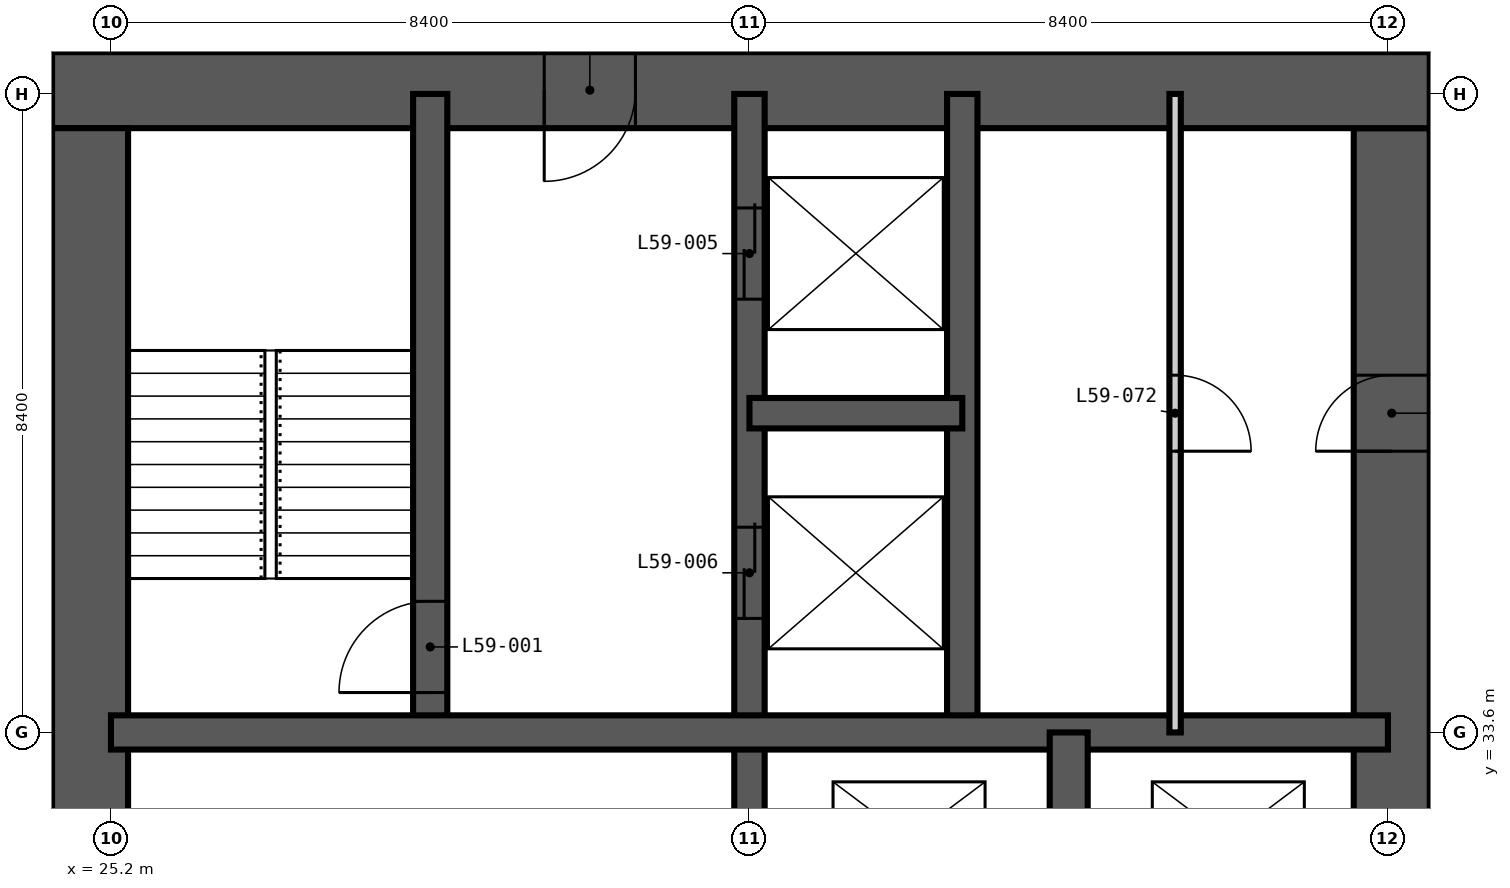
"""IFC4 building model, lengths in metres.
Left out: names, types, materials, properties, quantities, classifications, styles, units other than length and angle.
Written with IfcOpenShell. Run it as: python <this file> out.ifc"""

import sys

from ifc_helpers import new_model, si_unit, direction, frame, frame_2d, origin, place, context, subcontext, project, spatial, rectangle, extrude, element, fill, save


model = new_model("IFC4")
c1 = context("Model", 3, precision=1e-05, world=origin(), true_north=direction((0.0, 1.0)))
c2 = subcontext(c1, "Body", "Model", "MODEL_VIEW")
j1 = project(units=[si_unit("LENGTHUNIT", "METRE"), si_unit("PLANEANGLEUNIT", "RADIAN")], contexts=[c1])
p1 = place(None, origin())
s1 = spatial("IfcSite", under=j1, at=p1, CompositionType="ELEMENT")
p2 = place(p1, origin())
s2 = spatial("IfcBuilding", under=s1, at=p2, CompositionType="ELEMENT")
p3 = place(p2, frame((0.0, 0.0, 229.5)))
s3 = spatial("IfcBuildingStorey", under=s2, at=p3, CompositionType="ELEMENT", Elevation=229.5)
p4 = place(p3, frame((42.05, 17.25, -0.35), z_axis=(0.0, 0.0, 1.0), x_axis=(0.0, 1.0, 0.0)))
e1 = element("IfcWall", 1, at=p4, inside=s3, PredefinedType="SHEAR", context=c2, shape_type="SweptSolid", body=[
    extrude(rectangle(XDim=24.3, YDim=1.0, at=frame_2d((12.15, 0.0))), origin(), (0.0, 0.0, 1.0), 3.9),
])
p5 = place(p4, frame((0.35, 0.0, 0.35)))
e2 = element("IfcOpeningElement", 2, at=p5, cuts=e1, PredefinedType="OPENING", context=c2, shape_type="SweptSolid", body=[
    extrude(rectangle(XDim=1.2, YDim=2.2, at=frame_2d((0.6, 1.1))), frame((0.0, 0.51, 0.0), z_axis=(0.0, -1.0, 0.0), x_axis=(1.0, 0.0, 0.0)), (0.0, 0.0, 1.0), 1.02),
])
p6 = place(p4, frame((11.25, 0.0, 0.35)))
e3 = element("IfcOpeningElement", 3, at=p6, cuts=e1, PredefinedType="OPENING", context=c2, shape_type="SweptSolid", body=[
    extrude(rectangle(XDim=1.8, YDim=2.2, at=frame_2d((0.9, 1.1))), frame((0.0, 0.51, 0.0), z_axis=(0.0, -1.0, 0.0), x_axis=(1.0, 0.0, 0.0)), (0.0, 0.0, 1.0), 1.02),
])
p7 = place(p4, frame((20.05, 0.0, 0.35)))
e4 = element("IfcOpeningElement", 4, at=p7, cuts=e1, PredefinedType="OPENING", context=c2, shape_type="SweptSolid", body=[
    extrude(rectangle(XDim=1.0, YDim=2.1, at=frame_2d((0.5, 1.05))), frame((0.0, 0.51, 0.0), z_axis=(0.0, -1.0, 0.0), x_axis=(1.0, 0.0, 0.0)), (0.0, 0.0, 1.0), 1.02),
])
p8 = place(p3, frame((42.55, 42.05, -0.35), z_axis=(0.0, 0.0, 1.0), x_axis=(-1.0, 0.0, 0.0)))
e5 = element("IfcWall", 5, at=p8, inside=s3, PredefinedType="SHEAR", context=c2, shape_type="SweptSolid", body=[
    extrude(rectangle(XDim=18.125, YDim=1.0, at=frame_2d((9.062, 0.0))), origin(), (0.0, 0.0, 1.0), 3.9),
])
p9 = place(p8, frame((10.45, 0.0, 0.35)))
e6 = element("IfcOpeningElement", 6, at=p9, cuts=e5, PredefinedType="OPENING", context=c2, shape_type="SweptSolid", body=[
    extrude(rectangle(XDim=1.2, YDim=2.2, at=frame_2d((0.6, 1.1))), frame((0.0, 0.51, 0.0), z_axis=(0.0, -1.0, 0.0), x_axis=(1.0, 0.0, 0.0)), (0.0, 0.0, 1.0), 1.02),
])
p10 = place(p3, frame((24.925, 41.55, -0.35), z_axis=(0.0, 0.0, 1.0), x_axis=(0.0, -1.0, 0.0)))
e7 = element("IfcWall", 7, at=p10, inside=s3, PredefinedType="SHEAR", context=c2, shape_type="SweptSolid", body=[
    extrude(rectangle(XDim=24.3, YDim=1.0, at=frame_2d((12.15, 0.0))), origin(), (0.0, 0.0, 1.0), 3.9),
])
p11 = place(p10, frame((11.65, 0.0, 0.35)))
e8 = element("IfcOpeningElement", 8, at=p11, cuts=e7, PredefinedType="OPENING", context=c2, shape_type="SweptSolid", body=[
    extrude(rectangle(XDim=1.0, YDim=2.1, at=frame_2d((0.5, 1.05))), frame((0.0, 0.51, 0.0), z_axis=(0.0, -1.0, 0.0), x_axis=(1.0, 0.0, 0.0)), (0.0, 0.0, 1.0), 1.02),
])
p12 = place(p3, frame((33.6, 16.8, -0.35), z_axis=(0.0, 0.0, 1.0), x_axis=(0.0, 1.0, 0.0)))
e9 = element("IfcWall", 9, at=p12, inside=s3, PredefinedType="SHEAR", context=c2, shape_type="SweptSolid", body=[
    extrude(rectangle(XDim=25.2, YDim=0.4, at=frame_2d((12.6, 0.0))), origin(), (0.0, 0.0, 1.0), 3.9),
])
p13 = place(p12, frame((22.5, 0.0, 0.35)))
e10 = element("IfcOpeningElement", 10, at=p13, cuts=e9, PredefinedType="OPENING", context=c2, shape_type="SweptSolid", body=[
    extrude(rectangle(XDim=1.2, YDim=2.2, at=frame_2d((0.6, 1.1))), frame((0.0, 0.21, 0.0), z_axis=(0.0, -1.0, 0.0), x_axis=(1.0, 0.0, 0.0)), (0.0, 0.0, 1.0), 0.42),
])
p14 = place(p12, frame((18.3, 0.0, 0.35)))
e11 = element("IfcOpeningElement", 11, at=p14, cuts=e9, PredefinedType="OPENING", context=c2, shape_type="SweptSolid", body=[
    extrude(rectangle(XDim=1.2, YDim=2.2, at=frame_2d((0.6, 1.1))), frame((0.0, 0.21, 0.0), z_axis=(0.0, -1.0, 0.0), x_axis=(1.0, 0.0, 0.0)), (0.0, 0.0, 1.0), 0.42),
])
p15 = place(p12, frame((9.3, 0.0, 0.35)))
e12 = element("IfcOpeningElement", 12, at=p15, cuts=e9, PredefinedType="OPENING", context=c2, shape_type="SweptSolid", body=[
    extrude(rectangle(XDim=1.0, YDim=2.1, at=frame_2d((0.5, 1.05))), frame((0.0, 0.21, 0.0), z_axis=(0.0, -1.0, 0.0), x_axis=(1.0, 0.0, 0.0)), (0.0, 0.0, 1.0), 0.42),
])
p16 = place(p3, frame((36.4, 33.6, -0.35), z_axis=(0.0, 0.0, 1.0), x_axis=(0.0, 1.0, 0.0)))
e13 = element("IfcWall", 13, at=p16, inside=s3, PredefinedType="SHEAR", context=c2, shape_type="SweptSolid", body=[
    extrude(rectangle(XDim=8.4, YDim=0.4, at=frame_2d((4.2, 0.0))), origin(), (0.0, 0.0, 1.0), 3.9),
])
p17 = place(p3, frame((33.6, 37.8, -0.35), z_axis=(0.0, 0.0, 1.0), x_axis=(1.0, 0.0, 0.0)))
e14 = element("IfcWall", 14, at=p17, inside=s3, PredefinedType="SHEAR", context=c2, shape_type="SweptSolid", body=[
    extrude(rectangle(XDim=2.8, YDim=0.4, at=frame_2d((1.4, 0.0))), origin(), (0.0, 0.0, 1.0), 3.9),
])
p18 = place(p3, frame((29.4, 33.6, -0.35), z_axis=(0.0, 0.0, 1.0), x_axis=(0.0, 1.0, 0.0)))
e15 = element("IfcWall", 15, at=p18, inside=s3, PredefinedType="SHEAR", context=c2, shape_type="SweptSolid", body=[
    extrude(rectangle(XDim=8.4, YDim=0.45, at=frame_2d((4.2, 0.0))), origin(), (0.0, 0.0, 1.0), 3.9),
])
p19 = place(p18, frame((0.525, 0.0, 0.35)))
e16 = element("IfcOpeningElement", 16, at=p19, cuts=e15, PredefinedType="OPENING", context=c2, shape_type="SweptSolid", body=[
    extrude(rectangle(XDim=1.2, YDim=2.2, at=frame_2d((0.6, 1.1))), frame((0.0, 0.235, 0.0), z_axis=(0.0, -1.0, 0.0), x_axis=(1.0, 0.0, 0.0)), (0.0, 0.0, 1.0), 0.47),
])
p20 = place(p3, frame((25.2, 33.6, -0.35), z_axis=(0.0, 0.0, 1.0), x_axis=(1.0, 0.0, 0.0)))
e17 = element("IfcWall", 17, at=p20, inside=s3, PredefinedType="SHEAR", context=c2, shape_type="SweptSolid", body=[
    extrude(rectangle(XDim=16.8, YDim=0.45, at=frame_2d((8.4, 0.0))), origin(), (0.0, 0.0, 1.0), 3.9),
])
p21 = place(p3, frame((37.8, 30.8, -0.35), z_axis=(0.0, 0.0, 1.0), x_axis=(0.0, 1.0, 0.0)))
e18 = element("IfcWall", 18, at=p21, inside=s3, PredefinedType="SHEAR", context=c2, shape_type="SweptSolid", body=[
    extrude(rectangle(XDim=2.8, YDim=0.5, at=frame_2d((1.4, 0.0))), origin(), (0.0, 0.0, 1.0), 3.9),
])
p22 = place(p3, frame((39.2, 33.6, 0.0), z_axis=(0.0, 0.0, 1.0), x_axis=(0.0, 1.0, 0.0)))
e19 = element("IfcWall", 19, at=p22, inside=s3, PredefinedType="PARTITIONING", context=c2, shape_type="SweptSolid", body=[
    extrude(rectangle(XDim=8.4, YDim=0.15, at=frame_2d((4.2, 0.0))), origin(), (0.0, 0.0, 1.0), 3.55),
])
p23 = place(p22, frame((3.7, 0.0, 0.0)))
e20 = element("IfcOpeningElement", 20, at=p23, cuts=e19, PredefinedType="OPENING", context=c2, shape_type="SweptSolid", body=[
    extrude(rectangle(XDim=1.0, YDim=2.1, at=frame_2d((0.5, 1.05))), frame((0.0, 0.085, 0.0), z_axis=(0.0, -1.0, 0.0), x_axis=(1.0, 0.0, 0.0)), (0.0, 0.0, 1.0), 0.17),
])
p24 = place(p19, origin())
e21 = element("IfcDoor", 21, at=p24, inside=s3, OperationType="SINGLE_SWING_LEFT", PredefinedType="DOOR", context=c2, shape_type="SweptSolid", body=[
    extrude(rectangle(XDim=1.2, YDim=2.2, at=frame_2d((0.6, 1.1))), frame((0.0, 0.025, 0.0), z_axis=(0.0, -1.0, 0.0), x_axis=(1.0, 0.0, 0.0)), (0.0, 0.0, 1.0), 0.05),
])
fill(e16, e21)
p25 = place(p13, origin())
e22 = element("IfcDoor", 22, at=p25, inside=s3, OperationType="DOUBLE_DOOR_SLIDING", PredefinedType="DOOR", context=c2, shape_type="SweptSolid", body=[
    extrude(rectangle(XDim=1.2, YDim=2.2, at=frame_2d((0.6, 1.1))), frame((0.0, 0.025, 0.0), z_axis=(0.0, -1.0, 0.0), x_axis=(1.0, 0.0, 0.0)), (0.0, 0.0, 1.0), 0.05),
])
fill(e10, e22)
p26 = place(p14, origin())
e23 = element("IfcDoor", 23, at=p26, inside=s3, OperationType="DOUBLE_DOOR_SLIDING", PredefinedType="DOOR", context=c2, shape_type="SweptSolid", body=[
    extrude(rectangle(XDim=1.2, YDim=2.2, at=frame_2d((0.6, 1.1))), frame((0.0, 0.025, 0.0), z_axis=(0.0, -1.0, 0.0), x_axis=(1.0, 0.0, 0.0)), (0.0, 0.0, 1.0), 0.05),
])
fill(e11, e23)
p27 = place(p9, origin())
e24 = element("IfcDoor", 24, at=p27, inside=s3, OperationType="SINGLE_SWING_RIGHT", PredefinedType="DOOR", context=c2, shape_type="SweptSolid", body=[
    extrude(rectangle(XDim=1.2, YDim=2.2, at=frame_2d((0.6, 1.1))), frame((0.0, 0.025, 0.0), z_axis=(0.0, -1.0, 0.0), x_axis=(1.0, 0.0, 0.0)), (0.0, 0.0, 1.0), 0.05),
])
fill(e6, e24)
p28 = place(p7, origin())
e25 = element("IfcDoor", 25, at=p28, inside=s3, OperationType="SINGLE_SWING_LEFT", PredefinedType="DOOR", context=c2, shape_type="SweptSolid", body=[
    extrude(rectangle(XDim=1.0, YDim=2.1, at=frame_2d((0.5, 1.05))), frame((0.0, 0.025, 0.0), z_axis=(0.0, -1.0, 0.0), x_axis=(1.0, 0.0, 0.0)), (0.0, 0.0, 1.0), 0.05),
])
fill(e4, e25)
p29 = place(p23, frame((1.0, 0.0, 0.0), z_axis=(0.0, 0.0, 1.0), x_axis=(-1.0, 0.0, 0.0)))
e26 = element("IfcDoor", 26, at=p29, inside=s3, OperationType="SINGLE_SWING_RIGHT", PredefinedType="DOOR", context=c2, shape_type="SweptSolid", body=[
    extrude(rectangle(XDim=1.0, YDim=2.1, at=frame_2d((0.5, 1.05))), frame((0.0, 0.025, 0.0), z_axis=(0.0, -1.0, 0.0), x_axis=(1.0, 0.0, 0.0)), (0.0, 0.0, 1.0), 0.05),
])
fill(e20, e26)
save(model, sys.argv[1])
